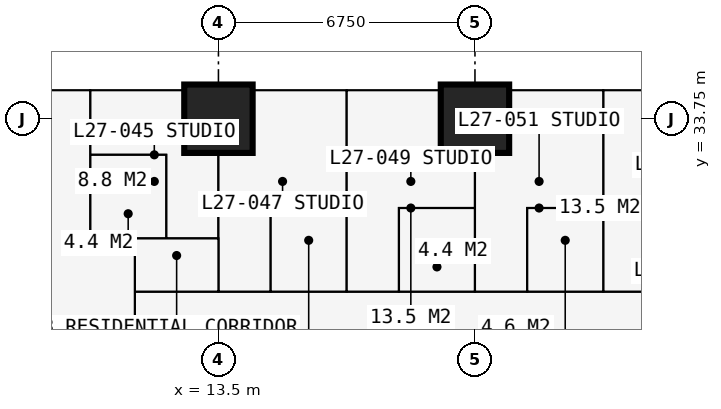
"""IFC4 building model, lengths in metres.
Left out: names, types, materials, properties, quantities, classifications, styles, units other than length and angle.
Written with IfcOpenShell. Run it as: python <this file> out.ifc"""

import sys

from ifc_helpers import new_model, si_unit, direction, frame, frame_2d, origin, origin_2d, place, context, subcontext, project, spatial, rectangle, extrude, element, fill, save


model = new_model("IFC4")
c1 = context("Model", 3, precision=1e-05, world=origin(), true_north=direction((0.0, 1.0)))
c2 = subcontext(c1, "Body", "Model", "MODEL_VIEW")
j1 = project(units=[si_unit("LENGTHUNIT", "METRE"), si_unit("PLANEANGLEUNIT", "RADIAN")], contexts=[c1])
p1 = place(None, origin())
s1 = spatial("IfcSite", under=j1, at=p1, CompositionType="ELEMENT")
p2 = place(p1, origin())
s2 = spatial("IfcBuilding", under=s1, at=p2, CompositionType="ELEMENT")
p3 = place(p2, frame((0.0, 0.0, 101.7)))
s3 = spatial("IfcBuildingStorey", under=s2, at=p3, CompositionType="ELEMENT", Elevation=101.7)
for number, where, z_axis, x_axis in (
    (1, (13.5, 33.75, 0.0), (0.0, 0.0, 1.0), (1.0, 0.0, 0.0)),
    (2, (20.25, 33.75, 0.0), (0.0, 0.0, 1.0), (1.0, 0.0, 0.0)),
):
    element("IfcColumn", number, at=place(p3, frame(where, z_axis=z_axis, x_axis=x_axis)), inside=s3, PredefinedType="COLUMN", context=c2, shape_type="SweptSolid", body=[
        extrude(rectangle(XDim=1.8, YDim=1.8, at=origin_2d()), origin(), (0.0, 0.0, 1.0), 3.6),
    ])
p4 = place(p3, frame((13.5, 34.5, 0.0), z_axis=(0.0, 0.0, 1.0), x_axis=(1.0, 0.0, 0.0)))
e3 = element("IfcWall", 3, at=p4, inside=s3, PredefinedType="SOLIDWALL", context=c2, shape_type="SweptSolid", body=[
    extrude(rectangle(XDim=6.75, YDim=0.15, at=frame_2d((3.375, 0.0))), origin(), (0.0, 0.0, 1.0), 3.375),
])
p5 = place(p4, frame((0.962, 0.0, 0.0)))
e4 = element("IfcOpeningElement", 4, at=p5, cuts=e3, PredefinedType="OPENING", context=c2, shape_type="SweptSolid", body=[
    extrude(rectangle(XDim=1.0, YDim=2.2, at=frame_2d((0.5, 1.1))), frame((0.0, 0.085, 0.0), z_axis=(0.0, -1.0, 0.0), x_axis=(1.0, 0.0, 0.0)), (0.0, 0.0, 1.0), 0.17),
])
p6 = place(p4, frame((2.025, 0.0, 0.9)))
e5 = element("IfcOpeningElement", 5, at=p6, cuts=e3, PredefinedType="OPENING", context=c2, shape_type="SweptSolid", body=[
    extrude(rectangle(XDim=1.2, YDim=1.8, at=frame_2d((0.6, 0.9))), frame((0.0, 0.085, 0.0), z_axis=(0.0, -1.0, 0.0), x_axis=(1.0, 0.0, 0.0)), (0.0, 0.0, 1.0), 0.17),
])
p7 = place(p4, frame((4.788, 0.0, 0.0)))
e6 = element("IfcOpeningElement", 6, at=p7, cuts=e3, PredefinedType="OPENING", context=c2, shape_type="SweptSolid", body=[
    extrude(rectangle(XDim=1.0, YDim=2.2, at=frame_2d((0.5, 1.1))), frame((0.0, 0.085, 0.0), z_axis=(0.0, -1.0, 0.0), x_axis=(1.0, 0.0, 0.0)), (0.0, 0.0, 1.0), 0.17),
])
p8 = place(p4, frame((3.525, 0.0, 0.9)))
e7 = element("IfcOpeningElement", 7, at=p8, cuts=e3, PredefinedType="OPENING", context=c2, shape_type="SweptSolid", body=[
    extrude(rectangle(XDim=1.2, YDim=1.8, at=frame_2d((0.6, 0.9))), frame((0.0, 0.085, 0.0), z_axis=(0.0, -1.0, 0.0), x_axis=(1.0, 0.0, 0.0)), (0.0, 0.0, 1.0), 0.17),
])
p9 = place(p3, frame((16.875, 34.6, 0.0), z_axis=(0.0, 0.0, 1.0), x_axis=(0.0, 1.0, 0.0)))
e8 = element("IfcWall", 8, at=p9, inside=s3, PredefinedType="USERDEFINED", context=c2, shape_type="SweptSolid", body=[
    extrude(rectangle(XDim=2.2, YDim=1.0, at=frame_2d((1.1, 0.0))), origin(), (0.0, 0.0, 1.0), 0.9),
])
p10 = place(p3, frame((10.125, 30.6, 0.0), z_axis=(0.0, 0.0, 1.0), x_axis=(0.0, 1.0, 0.0)))
e9 = element("IfcWall", 9, at=p10, inside=s3, PredefinedType="PARTITIONING", context=c2, shape_type="SweptSolid", body=[
    extrude(rectangle(XDim=3.884, YDim=0.1, at=frame_2d((1.942, 0.0))), origin(), (0.0, 0.0, 1.0), 3.375),
])
p11 = place(p3, frame((10.125, 30.6, 0.0), z_axis=(0.0, 0.0, 1.0), x_axis=(1.0, 0.0, 0.0)))
e10 = element("IfcWall", 10, at=p11, inside=s3, PredefinedType="PARTITIONING", context=c2, shape_type="SweptSolid", body=[
    extrude(rectangle(XDim=3.375, YDim=0.1, at=frame_2d((1.688, 0.0))), origin(), (0.0, 0.0, 1.0), 3.375),
])
p12 = place(p11, frame((2.2, 0.0, 0.0)))
e11 = element("IfcOpeningElement", 11, at=p12, cuts=e10, PredefinedType="OPENING", context=c2, shape_type="SweptSolid", body=[
    extrude(rectangle(XDim=0.95, YDim=2.2, at=frame_2d((0.475, 1.1))), frame((0.0, 0.06, 0.0), z_axis=(0.0, -1.0, 0.0), x_axis=(1.0, 0.0, 0.0)), (0.0, 0.0, 1.0), 0.12),
])
p13 = place(p3, frame((10.125, 32.8, 0.0), z_axis=(0.0, 0.0, 1.0), x_axis=(1.0, 0.0, 0.0)))
e12 = element("IfcWall", 12, at=p13, inside=s3, PredefinedType="PARTITIONING", context=c2, shape_type="SweptSolid", body=[
    extrude(rectangle(XDim=2.0, YDim=0.1, at=frame_2d((1.0, 0.0))), origin(), (0.0, 0.0, 1.0), 3.375),
])
p14 = place(p3, frame((11.3, 11.3, 0.0), z_axis=(0.0, 0.0, 1.0), x_axis=(0.0, 1.0, 0.0)))
e13 = element("IfcWall", 13, at=p14, inside=s3, PredefinedType="PARTITIONING", context=c2, shape_type="SweptSolid", body=[
    extrude(rectangle(XDim=19.3, YDim=0.15, at=frame_2d((9.65, 0.0))), origin(), (0.0, 0.0, 1.0), 3.375),
])
p15 = place(p14, frame((13.525, 0.0, 0.0)))
e14 = element("IfcOpeningElement", 14, at=p15, cuts=e13, PredefinedType="OPENING", context=c2, shape_type="SweptSolid", body=[
    extrude(rectangle(XDim=1.0, YDim=2.2, at=frame_2d((0.5, 1.1))), frame((0.0, 0.085, 0.0), z_axis=(0.0, -1.0, 0.0), x_axis=(1.0, 0.0, 0.0)), (0.0, 0.0, 1.0), 0.17),
])
p16 = place(p14, frame((10.438, 0.0, 0.0)))
e15 = element("IfcOpeningElement", 15, at=p16, cuts=e13, PredefinedType="OPENING", context=c2, shape_type="SweptSolid", body=[
    extrude(rectangle(XDim=1.0, YDim=2.2, at=frame_2d((0.5, 1.1))), frame((0.0, 0.085, 0.0), z_axis=(0.0, -1.0, 0.0), x_axis=(1.0, 0.0, 0.0)), (0.0, 0.0, 1.0), 0.17),
])
p17 = place(p3, frame((11.3, 29.2, 0.0), z_axis=(0.0, 0.0, 1.0), x_axis=(1.0, 0.0, 0.0)))
e16 = element("IfcWall", 16, at=p17, inside=s3, PredefinedType="PARTITIONING", context=c2, shape_type="SweptSolid", body=[
    extrude(rectangle(XDim=19.075, YDim=0.15, at=frame_2d((9.538, 0.0))), origin(), (0.0, 0.0, 1.0), 3.375),
])
p18 = place(p17, frame((5.825, 0.0, 0.0)))
e17 = element("IfcOpeningElement", 17, at=p18, cuts=e16, PredefinedType="OPENING", context=c2, shape_type="SweptSolid", body=[
    extrude(rectangle(XDim=0.95, YDim=2.2, at=frame_2d((0.475, 1.1))), frame((0.0, 0.085, 0.0), z_axis=(0.0, -1.0, 0.0), x_axis=(1.0, 0.0, 0.0)), (0.0, 0.0, 1.0), 0.17),
])
p19 = place(p17, frame((9.2, 0.0, 0.0)))
e18 = element("IfcOpeningElement", 18, at=p19, cuts=e16, PredefinedType="OPENING", context=c2, shape_type="SweptSolid", body=[
    extrude(rectangle(XDim=0.95, YDim=2.2, at=frame_2d((0.475, 1.1))), frame((0.0, 0.085, 0.0), z_axis=(0.0, -1.0, 0.0), x_axis=(1.0, 0.0, 0.0)), (0.0, 0.0, 1.0), 0.17),
])
p20 = place(p17, frame((0.6, 0.0, 0.0)))
e19 = element("IfcOpeningElement", 19, at=p20, cuts=e16, PredefinedType="OPENING", context=c2, shape_type="SweptSolid", body=[
    extrude(rectangle(XDim=1.0, YDim=2.2, at=frame_2d((0.5, 1.1))), frame((0.0, 0.085, 0.0), z_axis=(0.0, -1.0, 0.0), x_axis=(1.0, 0.0, 0.0)), (0.0, 0.0, 1.0), 0.17),
])
p21 = place(p3, frame((12.125, 30.6, 0.0), z_axis=(0.0, 0.0, 1.0), x_axis=(0.0, 1.0, 0.0)))
e20 = element("IfcWall", 20, at=p21, inside=s3, PredefinedType="PARTITIONING", context=c2, shape_type="SweptSolid", body=[
    extrude(rectangle(XDim=2.2, YDim=0.1, at=frame_2d((1.1, 0.0))), origin(), (0.0, 0.0, 1.0), 3.375),
])
p22 = place(p21, frame((0.65, 0.0, 0.0)))
e21 = element("IfcOpeningElement", 21, at=p22, cuts=e20, PredefinedType="OPENING", context=c2, shape_type="SweptSolid", body=[
    extrude(rectangle(XDim=0.9, YDim=2.2, at=frame_2d((0.45, 1.1))), frame((0.0, 0.06, 0.0), z_axis=(0.0, -1.0, 0.0), x_axis=(1.0, 0.0, 0.0)), (0.0, 0.0, 1.0), 0.12),
])
p23 = place(p3, frame((13.5, 29.2, 0.0), z_axis=(0.0, 0.0, 1.0), x_axis=(0.0, 1.0, 0.0)))
e22 = element("IfcWall", 22, at=p23, inside=s3, PredefinedType="PARTITIONING", context=c2, shape_type="SweptSolid", body=[
    extrude(rectangle(XDim=5.284, YDim=0.175, at=frame_2d((2.642, 0.0))), origin(), (0.0, 0.0, 1.0), 2.806),
])
p24 = place(p23, frame((0.25, 0.0, 0.0)))
e23 = element("IfcOpeningElement", 23, at=p24, cuts=e22, PredefinedType="OPENING", context=c2, shape_type="SweptSolid", body=[
    extrude(rectangle(XDim=0.95, YDim=2.2, at=frame_2d((0.475, 1.1))), frame((0.0, 0.097, 0.0), z_axis=(0.0, -1.0, 0.0), x_axis=(1.0, 0.0, 0.0)), (0.0, 0.0, 1.0), 0.195),
])
p25 = place(p3, frame((14.875, 29.2, 0.0), z_axis=(0.0, 0.0, 1.0), x_axis=(0.0, 1.0, 0.0)))
e24 = element("IfcWall", 24, at=p25, inside=s3, PredefinedType="PARTITIONING", context=c2, shape_type="SweptSolid", body=[
    extrude(rectangle(XDim=2.2, YDim=0.1, at=frame_2d((1.1, 0.0))), origin(), (0.0, 0.0, 1.0), 3.375),
])
p26 = place(p25, frame((0.65, 0.0, 0.0)))
e25 = element("IfcOpeningElement", 25, at=p26, cuts=e24, PredefinedType="OPENING", context=c2, shape_type="SweptSolid", body=[
    extrude(rectangle(XDim=0.9, YDim=2.2, at=frame_2d((0.45, 1.1))), frame((0.0, 0.06, 0.0), z_axis=(0.0, -1.0, 0.0), x_axis=(1.0, 0.0, 0.0)), (0.0, 0.0, 1.0), 0.12),
])
p27 = place(p3, frame((14.875, 31.4, 0.0), z_axis=(0.0, 0.0, 1.0), x_axis=(1.0, 0.0, 0.0)))
e26 = element("IfcWall", 26, at=p27, inside=s3, PredefinedType="PARTITIONING", context=c2, shape_type="SweptSolid", body=[
    extrude(rectangle(XDim=2.0, YDim=0.1, at=frame_2d((1.0, 0.0))), origin(), (0.0, 0.0, 1.0), 3.375),
])
p28 = place(p3, frame((16.875, 29.2, 0.0), z_axis=(0.0, 0.0, 1.0), x_axis=(0.0, 1.0, 0.0)))
e27 = element("IfcWall", 27, at=p28, inside=s3, PredefinedType="PARTITIONING", context=c2, shape_type="SweptSolid", body=[
    extrude(rectangle(XDim=5.284, YDim=0.175, at=frame_2d((2.642, 0.0))), origin(), (0.0, 0.0, 1.0), 3.375),
])
p29 = place(p3, frame((18.25, 29.2, 0.0), z_axis=(0.0, 0.0, 1.0), x_axis=(0.0, 1.0, 0.0)))
e28 = element("IfcWall", 28, at=p29, inside=s3, PredefinedType="PARTITIONING", context=c2, shape_type="SweptSolid", body=[
    extrude(rectangle(XDim=2.2, YDim=0.1, at=frame_2d((1.1, 0.0))), origin(), (0.0, 0.0, 1.0), 3.375),
])
p30 = place(p29, frame((0.65, 0.0, 0.0)))
e29 = element("IfcOpeningElement", 29, at=p30, cuts=e28, PredefinedType="OPENING", context=c2, shape_type="SweptSolid", body=[
    extrude(rectangle(XDim=0.9, YDim=2.2, at=frame_2d((0.45, 1.1))), frame((0.0, 0.06, 0.0), z_axis=(0.0, -1.0, 0.0), x_axis=(1.0, 0.0, 0.0)), (0.0, 0.0, 1.0), 0.12),
])
p31 = place(p3, frame((18.25, 31.4, 0.0), z_axis=(0.0, 0.0, 1.0), x_axis=(1.0, 0.0, 0.0)))
e30 = element("IfcWall", 30, at=p31, inside=s3, PredefinedType="PARTITIONING", context=c2, shape_type="SweptSolid", body=[
    extrude(rectangle(XDim=2.0, YDim=0.1, at=frame_2d((1.0, 0.0))), origin(), (0.0, 0.0, 1.0), 3.375),
])
p32 = place(p3, frame((20.25, 29.2, 0.0), z_axis=(0.0, 0.0, 1.0), x_axis=(0.0, 1.0, 0.0)))
e31 = element("IfcWall", 31, at=p32, inside=s3, PredefinedType="PARTITIONING", context=c2, shape_type="SweptSolid", body=[
    extrude(rectangle(XDim=5.284, YDim=0.175, at=frame_2d((2.642, 0.0))), origin(), (0.0, 0.0, 1.0), 2.61),
])
p33 = place(p3, frame((21.625, 29.2, 0.0), z_axis=(0.0, 0.0, 1.0), x_axis=(0.0, 1.0, 0.0)))
e32 = element("IfcWall", 32, at=p33, inside=s3, PredefinedType="PARTITIONING", context=c2, shape_type="SweptSolid", body=[
    extrude(rectangle(XDim=2.2, YDim=0.1, at=frame_2d((1.1, 0.0))), origin(), (0.0, 0.0, 1.0), 3.375),
])
p34 = place(p33, frame((0.65, 0.0, 0.0)))
e33 = element("IfcOpeningElement", 33, at=p34, cuts=e32, PredefinedType="OPENING", context=c2, shape_type="SweptSolid", body=[
    extrude(rectangle(XDim=0.9, YDim=2.2, at=frame_2d((0.45, 1.1))), frame((0.0, 0.06, 0.0), z_axis=(0.0, -1.0, 0.0), x_axis=(1.0, 0.0, 0.0)), (0.0, 0.0, 1.0), 0.12),
])
p35 = place(p3, frame((21.625, 31.4, 0.0), z_axis=(0.0, 0.0, 1.0), x_axis=(1.0, 0.0, 0.0)))
e34 = element("IfcWall", 34, at=p35, inside=s3, PredefinedType="PARTITIONING", context=c2, shape_type="SweptSolid", body=[
    extrude(rectangle(XDim=2.0, YDim=0.1, at=frame_2d((1.0, 0.0))), origin(), (0.0, 0.0, 1.0), 3.375),
])
p36 = place(p3, frame((23.625, 29.2, 0.0), z_axis=(0.0, 0.0, 1.0), x_axis=(0.0, 1.0, 0.0)))
e35 = element("IfcWall", 35, at=p36, inside=s3, PredefinedType="PARTITIONING", context=c2, shape_type="SweptSolid", body=[
    extrude(rectangle(XDim=5.284, YDim=0.15, at=frame_2d((2.642, 0.0))), origin(), (0.0, 0.0, 1.0), 3.375),
])
p37 = place(p5, origin())
e36 = element("IfcDoor", 36, at=p37, inside=s3, OperationType="SINGLE_SWING_LEFT", PredefinedType="DOOR", context=c2, shape_type="SweptSolid", body=[
    extrude(rectangle(XDim=1.0, YDim=2.2, at=frame_2d((0.5, 1.1))), frame((0.0, 0.025, 0.0), z_axis=(0.0, -1.0, 0.0), x_axis=(1.0, 0.0, 0.0)), (0.0, 0.0, 1.0), 0.05),
])
fill(e4, e36)
p38 = place(p6, origin())
e37 = element("IfcWindow", 37, at=p38, inside=s3, PartitioningType="SINGLE_PANEL", PredefinedType="WINDOW", context=c2, shape_type="SweptSolid", body=[
    extrude(rectangle(XDim=1.2, YDim=1.8, at=frame_2d((0.6, 0.9))), frame((0.0, 0.03, 0.0), z_axis=(0.0, -1.0, 0.0), x_axis=(1.0, 0.0, 0.0)), (0.0, 0.0, 1.0), 0.06),
])
fill(e5, e37)
p39 = place(p7, origin())
e38 = element("IfcDoor", 38, at=p39, inside=s3, OperationType="SINGLE_SWING_RIGHT", PredefinedType="DOOR", context=c2, shape_type="SweptSolid", body=[
    extrude(rectangle(XDim=1.0, YDim=2.2, at=frame_2d((0.5, 1.1))), frame((0.0, 0.025, 0.0), z_axis=(0.0, -1.0, 0.0), x_axis=(1.0, 0.0, 0.0)), (0.0, 0.0, 1.0), 0.05),
])
fill(e6, e38)
p40 = place(p8, origin())
e39 = element("IfcWindow", 39, at=p40, inside=s3, PartitioningType="SINGLE_PANEL", PredefinedType="WINDOW", context=c2, shape_type="SweptSolid", body=[
    extrude(rectangle(XDim=1.2, YDim=1.8, at=frame_2d((0.6, 0.9))), frame((0.0, 0.03, 0.0), z_axis=(0.0, -1.0, 0.0), x_axis=(1.0, 0.0, 0.0)), (0.0, 0.0, 1.0), 0.06),
])
fill(e7, e39)
p41 = place(p12, origin())
e40 = element("IfcDoor", 40, at=p41, inside=s3, OperationType="SINGLE_SWING_LEFT", PredefinedType="DOOR", context=c2, shape_type="SweptSolid", body=[
    extrude(rectangle(XDim=0.95, YDim=2.2, at=frame_2d((0.475, 1.1))), frame((0.0, 0.025, 0.0), z_axis=(0.0, -1.0, 0.0), x_axis=(1.0, 0.0, 0.0)), (0.0, 0.0, 1.0), 0.05),
])
fill(e11, e40)
p42 = place(p22, origin())
e41 = element("IfcDoor", 41, at=p42, inside=s3, OperationType="SINGLE_SWING_RIGHT", PredefinedType="DOOR", context=c2, shape_type="SweptSolid", body=[
    extrude(rectangle(XDim=0.9, YDim=2.2, at=frame_2d((0.45, 1.1))), frame((0.0, 0.025, 0.0), z_axis=(0.0, -1.0, 0.0), x_axis=(1.0, 0.0, 0.0)), (0.0, 0.0, 1.0), 0.05),
])
fill(e21, e41)
p43 = place(p24, origin())
e42 = element("IfcDoor", 42, at=p43, inside=s3, OperationType="SINGLE_SWING_LEFT", PredefinedType="DOOR", context=c2, shape_type="SweptSolid", body=[
    extrude(rectangle(XDim=0.95, YDim=2.2, at=frame_2d((0.475, 1.1))), frame((0.0, 0.025, 0.0), z_axis=(0.0, -1.0, 0.0), x_axis=(1.0, 0.0, 0.0)), (0.0, 0.0, 1.0), 0.05),
])
fill(e23, e42)
p44 = place(p26, origin())
e43 = element("IfcDoor", 43, at=p44, inside=s3, OperationType="SINGLE_SWING_RIGHT", PredefinedType="DOOR", context=c2, shape_type="SweptSolid", body=[
    extrude(rectangle(XDim=0.9, YDim=2.2, at=frame_2d((0.45, 1.1))), frame((0.0, 0.025, 0.0), z_axis=(0.0, -1.0, 0.0), x_axis=(1.0, 0.0, 0.0)), (0.0, 0.0, 1.0), 0.05),
])
fill(e25, e43)
p45 = place(p18, origin())
e44 = element("IfcDoor", 44, at=p45, inside=s3, OperationType="SINGLE_SWING_LEFT", PredefinedType="DOOR", context=c2, shape_type="SweptSolid", body=[
    extrude(rectangle(XDim=0.95, YDim=2.2, at=frame_2d((0.475, 1.1))), frame((0.0, 0.025, 0.0), z_axis=(0.0, -1.0, 0.0), x_axis=(1.0, 0.0, 0.0)), (0.0, 0.0, 1.0), 0.05),
])
fill(e17, e44)
p46 = place(p30, origin())
e45 = element("IfcDoor", 45, at=p46, inside=s3, OperationType="SINGLE_SWING_RIGHT", PredefinedType="DOOR", context=c2, shape_type="SweptSolid", body=[
    extrude(rectangle(XDim=0.9, YDim=2.2, at=frame_2d((0.45, 1.1))), frame((0.0, 0.025, 0.0), z_axis=(0.0, -1.0, 0.0), x_axis=(1.0, 0.0, 0.0)), (0.0, 0.0, 1.0), 0.05),
])
fill(e29, e45)
p47 = place(p19, origin())
e46 = element("IfcDoor", 46, at=p47, inside=s3, OperationType="SINGLE_SWING_LEFT", PredefinedType="DOOR", context=c2, shape_type="SweptSolid", body=[
    extrude(rectangle(XDim=0.95, YDim=2.2, at=frame_2d((0.475, 1.1))), frame((0.0, 0.025, 0.0), z_axis=(0.0, -1.0, 0.0), x_axis=(1.0, 0.0, 0.0)), (0.0, 0.0, 1.0), 0.05),
])
fill(e18, e46)
p48 = place(p34, origin())
e47 = element("IfcDoor", 47, at=p48, inside=s3, OperationType="SINGLE_SWING_RIGHT", PredefinedType="DOOR", context=c2, shape_type="SweptSolid", body=[
    extrude(rectangle(XDim=0.9, YDim=2.2, at=frame_2d((0.45, 1.1))), frame((0.0, 0.025, 0.0), z_axis=(0.0, -1.0, 0.0), x_axis=(1.0, 0.0, 0.0)), (0.0, 0.0, 1.0), 0.05),
])
fill(e33, e47)
p49 = place(p20, origin())
e48 = element("IfcDoor", 48, at=p49, inside=s3, OperationType="SINGLE_SWING_LEFT", PredefinedType="DOOR", context=c2, shape_type="SweptSolid", body=[
    extrude(rectangle(XDim=1.0, YDim=2.2, at=frame_2d((0.5, 1.1))), frame((0.0, 0.025, 0.0), z_axis=(0.0, -1.0, 0.0), x_axis=(1.0, 0.0, 0.0)), (0.0, 0.0, 1.0), 0.05),
])
fill(e19, e48)
save(model, sys.argv[1])
